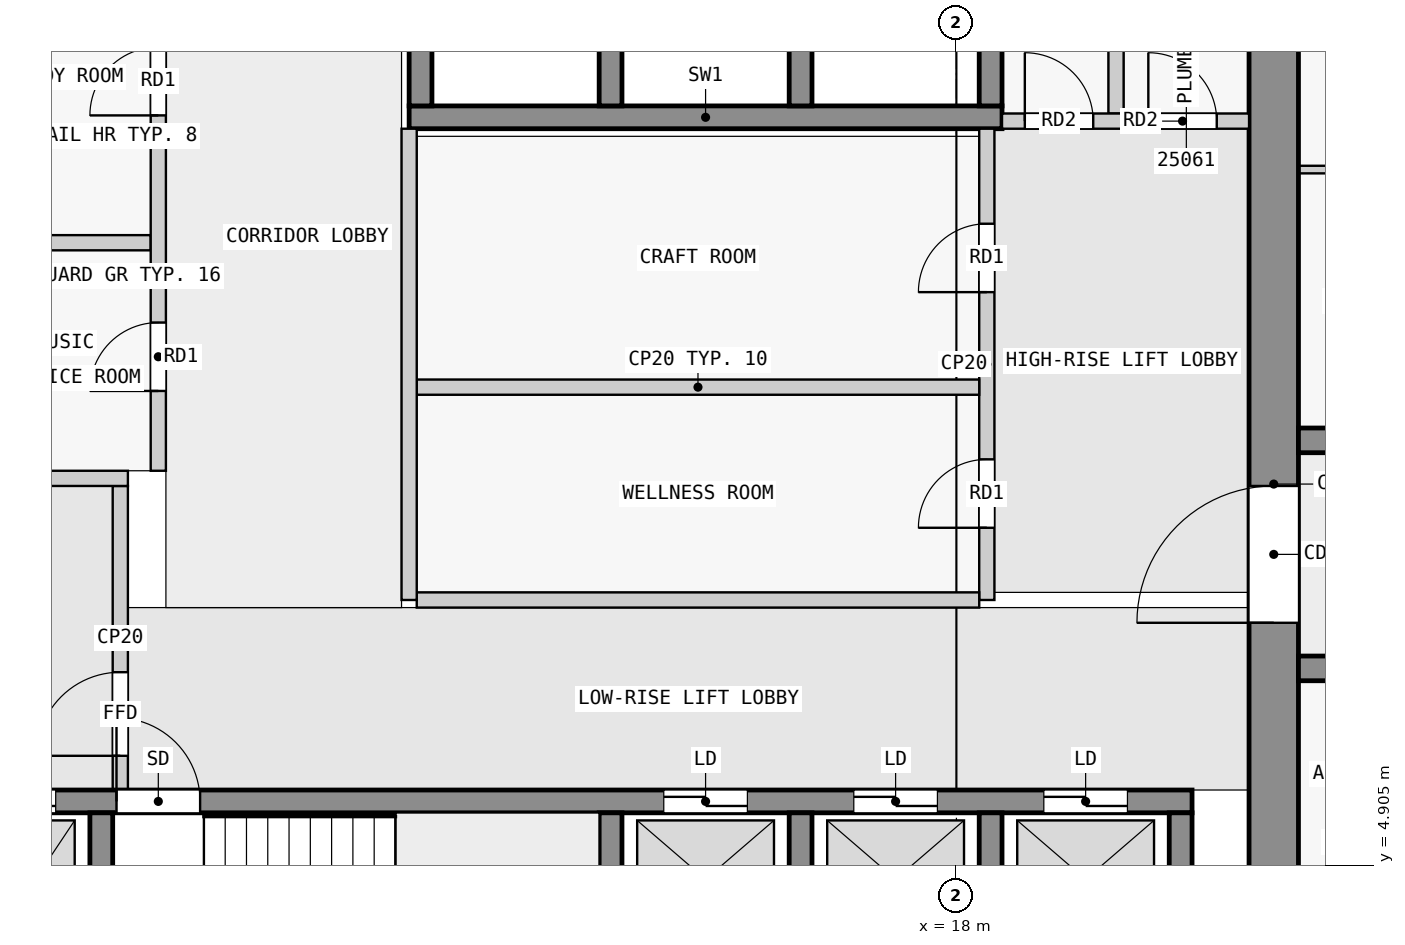
"""IFC4 building model, lengths in metres.
Left out: names, types, materials, properties, quantities, classifications, styles, units other than length and angle.
Written with IfcOpenShell. Run it as: python <this file> out.ifc"""

import sys

from ifc_helpers import new_model, si_unit, direction, frame, frame_2d, origin, place, context, subcontext, project, spatial, rectangle, extrude, element, fill, save


model = new_model("IFC4")
c1 = context("Model", 3, precision=1e-05, world=origin(), true_north=direction((0.0, 1.0)))
c2 = subcontext(c1, "Body", "Model", "MODEL_VIEW")
j1 = project(units=[si_unit("LENGTHUNIT", "METRE"), si_unit("PLANEANGLEUNIT", "RADIAN")], contexts=[c1])
p1 = place(None, origin())
s1 = spatial("IfcSite", under=j1, at=p1, CompositionType="ELEMENT")
p2 = place(p1, origin())
s2 = spatial("IfcBuilding", under=s1, at=p2, CompositionType="ELEMENT")
p3 = place(p2, frame((0.0, 0.0, 99.3)))
s3 = spatial("IfcBuildingStorey", under=s2, at=p3, CompositionType="ELEMENT", Elevation=99.3)
p4 = place(p3, frame((22.175, 2.5, 0.0), z_axis=(0.0, 0.0, 1.0), x_axis=(0.0, 1.0, 0.0)))
e1 = element("IfcWall", 1, at=p4, inside=s3, PredefinedType="SHEAR", context=c2, shape_type="SweptSolid", body=[
    extrude(rectangle(XDim=14.85, YDim=0.65, at=frame_2d((7.425, 0.0))), origin(), (0.0, 0.0, 1.0), 3.25),
])
p5 = place(p4, frame((5.6, 0.0, 0.0)))
e2 = element("IfcOpeningElement", 2, at=p5, cuts=e1, PredefinedType="OPENING", context=c2, shape_type="SweptSolid", body=[
    extrude(rectangle(XDim=1.8, YDim=2.1, at=frame_2d((0.9, 1.05))), frame((0.0, 0.335, 0.0), z_axis=(0.0, -1.0, 0.0), x_axis=(1.0, 0.0, 0.0)), (0.0, 0.0, 1.0), 0.67),
])
for number, where, z_axis, x_axis in (
    (3, (6.75, 2.8, 0.0), (0.0, 0.0, 1.0), (0.0, 1.0, 0.0)),
    (4, (13.45, 2.8, 0.0), (0.0, 0.0, 1.0), (0.0, 1.0, 0.0)),
    (5, (15.95, 2.8, 0.0), (0.0, 0.0, 1.0), (0.0, 1.0, 0.0)),
    (6, (18.45, 2.8, 0.0), (0.0, 0.0, 1.0), (0.0, 1.0, 0.0)),
    (7, (20.95, 2.8, 0.0), (0.0, 0.0, 1.0), (0.0, 1.0, 0.0)),
):
    element("IfcWall", number, at=place(p3, frame(where, z_axis=z_axis, x_axis=x_axis)), inside=s3, PredefinedType="SHEAR", context=c2, shape_type="SweptSolid", body=[
        extrude(rectangle(XDim=2.8, YDim=0.3, at=frame_2d((1.4, 0.0))), origin(), (0.0, 0.0, 1.0), 3.25),
    ])
p6 = place(p3, frame((2.3, 5.75, 0.0), z_axis=(0.0, 0.0, 1.0), x_axis=(1.0, 0.0, 0.0)))
e8 = element("IfcWall", 8, at=p6, inside=s3, PredefinedType="SHEAR", context=c2, shape_type="SweptSolid", body=[
    extrude(rectangle(XDim=18.8, YDim=0.3, at=frame_2d((9.4, 0.0))), origin(), (0.0, 0.0, 1.0), 3.25),
])
p7 = place(p6, frame((4.65, 0.0, 0.0)))
e9 = element("IfcOpeningElement", 9, at=p7, cuts=e8, PredefinedType="OPENING", context=c2, shape_type="SweptSolid", body=[
    extrude(rectangle(XDim=1.1, YDim=2.1, at=frame_2d((0.55, 1.05))), frame((0.0, 0.16, 0.0), z_axis=(0.0, -1.0, 0.0), x_axis=(1.0, 0.0, 0.0)), (0.0, 0.0, 1.0), 0.32),
])
p8 = place(p6, frame((0.45, 0.0, 0.0)))
e10 = element("IfcOpeningElement", 10, at=p8, cuts=e8, PredefinedType="OPENING", context=c2, shape_type="SweptSolid", body=[
    extrude(rectangle(XDim=1.1, YDim=2.1, at=frame_2d((0.55, 1.05))), frame((0.0, 0.16, 0.0), z_axis=(0.0, -1.0, 0.0), x_axis=(1.0, 0.0, 0.0)), (0.0, 0.0, 1.0), 0.32),
])
p9 = place(p6, frame((2.75, 0.0, 0.0)))
e11 = element("IfcOpeningElement", 11, at=p9, cuts=e8, PredefinedType="OPENING", context=c2, shape_type="SweptSolid", body=[
    extrude(rectangle(XDim=1.1, YDim=2.1, at=frame_2d((0.55, 1.05))), frame((0.0, 0.16, 0.0), z_axis=(0.0, -1.0, 0.0), x_axis=(1.0, 0.0, 0.0)), (0.0, 0.0, 1.0), 0.32),
])
p10 = place(p6, frame((11.85, 0.0, 0.0)))
e12 = element("IfcOpeningElement", 12, at=p10, cuts=e8, PredefinedType="OPENING", context=c2, shape_type="SweptSolid", body=[
    extrude(rectangle(XDim=1.1, YDim=2.1, at=frame_2d((0.55, 1.05))), frame((0.0, 0.16, 0.0), z_axis=(0.0, -1.0, 0.0), x_axis=(1.0, 0.0, 0.0)), (0.0, 0.0, 1.0), 0.32),
])
p11 = place(p6, frame((14.35, 0.0, 0.0)))
e13 = element("IfcOpeningElement", 13, at=p11, cuts=e8, PredefinedType="OPENING", context=c2, shape_type="SweptSolid", body=[
    extrude(rectangle(XDim=1.1, YDim=2.1, at=frame_2d((0.55, 1.05))), frame((0.0, 0.16, 0.0), z_axis=(0.0, -1.0, 0.0), x_axis=(1.0, 0.0, 0.0)), (0.0, 0.0, 1.0), 0.32),
])
p12 = place(p6, frame((16.85, 0.0, 0.0)))
e14 = element("IfcOpeningElement", 14, at=p12, cuts=e8, PredefinedType="OPENING", context=c2, shape_type="SweptSolid", body=[
    extrude(rectangle(XDim=1.1, YDim=2.1, at=frame_2d((0.55, 1.05))), frame((0.0, 0.16, 0.0), z_axis=(0.0, -1.0, 0.0), x_axis=(1.0, 0.0, 0.0)), (0.0, 0.0, 1.0), 0.32),
])
p13 = place(p3, frame((10.8, 14.75, 0.0), z_axis=(0.0, 0.0, 1.0), x_axis=(1.0, 0.0, 0.0)))
e15 = element("IfcWall", 15, at=p13, inside=s3, PredefinedType="SHEAR", context=c2, shape_type="SweptSolid", body=[
    extrude(rectangle(XDim=7.8, YDim=0.3, at=frame_2d((3.9, 0.0))), origin(), (0.0, 0.0, 1.0), 3.25),
])
for number, where, z_axis, x_axis in (
    (16, (10.95, 14.9, 0.0), (0.0, 0.0, 1.0), (0.0, 1.0, 0.0)),
    (17, (13.45, 14.9, 0.0), (0.0, 0.0, 1.0), (0.0, 1.0, 0.0)),
    (18, (15.95, 14.9, 0.0), (0.0, 0.0, 1.0), (0.0, 1.0, 0.0)),
    (19, (18.45, 14.9, 0.0), (0.0, 0.0, 1.0), (0.0, 1.0, 0.0)),
):
    element("IfcWall", number, at=place(p3, frame(where, z_axis=z_axis, x_axis=x_axis)), inside=s3, PredefinedType="SHEAR", context=c2, shape_type="SweptSolid", body=[
        extrude(rectangle(XDim=2.0, YDim=0.3, at=frame_2d((1.0, 0.0))), origin(), (0.0, 0.0, 1.0), 3.25),
    ])
p14 = place(p3, frame((22.5, 7.5, 0.0), z_axis=(0.0, 0.0, 1.0), x_axis=(1.0, 0.0, 0.0)))
e20 = element("IfcWall", 20, at=p14, inside=s3, PredefinedType="SHEAR", context=c2, shape_type="SweptSolid", body=[
    extrude(rectangle(XDim=22.5, YDim=0.325, at=frame_2d((11.25, 0.0))), origin(), (0.0, 0.0, 1.0), 3.25),
])
p15 = place(p14, frame((4.05, 0.0, 0.0)))
e21 = element("IfcOpeningElement", 21, at=p15, cuts=e20, PredefinedType="OPENING", context=c2, shape_type="SweptSolid", body=[
    extrude(rectangle(XDim=1.0, YDim=2.1, at=frame_2d((0.5, 1.05))), frame((0.0, 0.172, 0.0), z_axis=(0.0, -1.0, 0.0), x_axis=(1.0, 0.0, 0.0)), (0.0, 0.0, 1.0), 0.345),
])
p16 = place(p14, frame((10.75, 0.0, 0.0)))
e22 = element("IfcOpeningElement", 22, at=p16, cuts=e20, PredefinedType="OPENING", context=c2, shape_type="SweptSolid", body=[
    extrude(rectangle(XDim=1.0, YDim=2.1, at=frame_2d((0.5, 1.05))), frame((0.0, 0.172, 0.0), z_axis=(0.0, -1.0, 0.0), x_axis=(1.0, 0.0, 0.0)), (0.0, 0.0, 1.0), 0.345),
])
p17 = place(p14, frame((16.85, 0.0, 0.0)))
e23 = element("IfcOpeningElement", 23, at=p17, cuts=e20, PredefinedType="OPENING", context=c2, shape_type="SweptSolid", body=[
    extrude(rectangle(XDim=1.0, YDim=2.1, at=frame_2d((0.5, 1.05))), frame((0.0, 0.172, 0.0), z_axis=(0.0, -1.0, 0.0), x_axis=(1.0, 0.0, 0.0)), (0.0, 0.0, 1.0), 0.345),
])
p18 = place(p3, frame((22.5, 10.5, 0.0), z_axis=(0.0, 0.0, 1.0), x_axis=(1.0, 0.0, 0.0)))
e24 = element("IfcWall", 24, at=p18, inside=s3, PredefinedType="SHEAR", context=c2, shape_type="SweptSolid", body=[
    extrude(rectangle(XDim=22.5, YDim=0.325, at=frame_2d((11.25, 0.0))), origin(), (0.0, 0.0, 1.0), 3.25),
])
p19 = place(p18, frame((1.75, 0.0, 0.0)))
e25 = element("IfcOpeningElement", 25, at=p19, cuts=e24, PredefinedType="OPENING", context=c2, shape_type="SweptSolid", body=[
    extrude(rectangle(XDim=1.0, YDim=2.1, at=frame_2d((0.5, 1.05))), frame((0.0, 0.172, 0.0), z_axis=(0.0, -1.0, 0.0), x_axis=(1.0, 0.0, 0.0)), (0.0, 0.0, 1.0), 0.345),
])
p20 = place(p18, frame((6.25, 0.0, 0.0)))
e26 = element("IfcOpeningElement", 26, at=p20, cuts=e24, PredefinedType="OPENING", context=c2, shape_type="SweptSolid", body=[
    extrude(rectangle(XDim=1.0, YDim=2.1, at=frame_2d((0.5, 1.05))), frame((0.0, 0.172, 0.0), z_axis=(0.0, -1.0, 0.0), x_axis=(1.0, 0.0, 0.0)), (0.0, 0.0, 1.0), 0.345),
])
p21 = place(p18, frame((10.85, 0.0, 0.0)))
e27 = element("IfcOpeningElement", 27, at=p21, cuts=e24, PredefinedType="OPENING", context=c2, shape_type="SweptSolid", body=[
    extrude(rectangle(XDim=0.9, YDim=2.1, at=frame_2d((0.45, 1.05))), frame((0.0, 0.172, 0.0), z_axis=(0.0, -1.0, 0.0), x_axis=(1.0, 0.0, 0.0)), (0.0, 0.0, 1.0), 0.345),
])
p22 = place(p18, frame((15.25, 0.0, 0.0)))
e28 = element("IfcOpeningElement", 28, at=p22, cuts=e24, PredefinedType="OPENING", context=c2, shape_type="SweptSolid", body=[
    extrude(rectangle(XDim=1.0, YDim=2.1, at=frame_2d((0.5, 1.05))), frame((0.0, 0.172, 0.0), z_axis=(0.0, -1.0, 0.0), x_axis=(1.0, 0.0, 0.0)), (0.0, 0.0, 1.0), 0.345),
])
p23 = place(p18, frame((18.75, 0.0, 0.0)))
e29 = element("IfcOpeningElement", 29, at=p23, cuts=e24, PredefinedType="OPENING", context=c2, shape_type="SweptSolid", body=[
    extrude(rectangle(XDim=0.9, YDim=2.1, at=frame_2d((0.45, 1.05))), frame((0.0, 0.172, 0.0), z_axis=(0.0, -1.0, 0.0), x_axis=(1.0, 0.0, 0.0)), (0.0, 0.0, 1.0), 0.345),
])
p24 = place(p18, frame((20.95, 0.0, 0.0)))
e30 = element("IfcOpeningElement", 30, at=p24, cuts=e24, PredefinedType="OPENING", context=c2, shape_type="SweptSolid", body=[
    extrude(rectangle(XDim=1.0, YDim=2.1, at=frame_2d((0.5, 1.05))), frame((0.0, 0.172, 0.0), z_axis=(0.0, -1.0, 0.0), x_axis=(1.0, 0.0, 0.0)), (0.0, 0.0, 1.0), 0.345),
])
p25 = place(p3, frame((7.0, 5.9, 0.0), z_axis=(0.0, 0.0, 1.0), x_axis=(0.0, 1.0, 0.0)))
e31 = element("IfcWall", 31, at=p25, inside=s3, PredefinedType="PARTITIONING", context=c2, shape_type="SweptSolid", body=[
    extrude(rectangle(XDim=4.0, YDim=0.2, at=frame_2d((2.0, 0.0))), origin(), (0.0, 0.0, 1.0), 3.25),
])
p26 = place(p25, frame((0.45, 0.0, 0.0)))
e32 = element("IfcOpeningElement", 32, at=p26, cuts=e31, PredefinedType="OPENING", context=c2, shape_type="SweptSolid", body=[
    extrude(rectangle(XDim=1.1, YDim=2.1, at=frame_2d((0.55, 1.05))), frame((0.0, 0.11, 0.0), z_axis=(0.0, -1.0, 0.0), x_axis=(1.0, 0.0, 0.0)), (0.0, 0.0, 1.0), 0.22),
])
p27 = place(p3, frame((5.15, 10.0, 0.0), z_axis=(0.0, 0.0, 1.0), x_axis=(1.0, 0.0, 0.0)))
e33 = element("IfcWall", 33, at=p27, inside=s3, PredefinedType="PARTITIONING", context=c2, shape_type="SweptSolid", body=[
    extrude(rectangle(XDim=1.95, YDim=0.2, at=frame_2d((0.975, 0.0))), origin(), (0.0, 0.0, 1.0), 3.25),
])
p28 = place(p3, frame((10.8, 8.4, 0.0), z_axis=(0.0, 0.0, 1.0), x_axis=(0.0, 1.0, 0.0)))
e34 = element("IfcWall", 34, at=p28, inside=s3, PredefinedType="PARTITIONING", context=c2, shape_type="SweptSolid", body=[
    extrude(rectangle(XDim=6.2, YDim=0.2, at=frame_2d((3.1, 0.0))), origin(), (0.0, 0.0, 1.0), 3.25),
])
p29 = place(p3, frame((10.9, 8.4, 0.0), z_axis=(0.0, 0.0, 1.0), x_axis=(1.0, 0.0, 0.0)))
e35 = element("IfcWall", 35, at=p29, inside=s3, PredefinedType="PARTITIONING", context=c2, shape_type="SweptSolid", body=[
    extrude(rectangle(XDim=7.4, YDim=0.2, at=frame_2d((3.7, 0.0))), origin(), (0.0, 0.0, 1.0), 3.25),
])
p30 = place(p3, frame((18.4, 8.4, 0.0), z_axis=(0.0, 0.0, 1.0), x_axis=(0.0, 1.0, 0.0)))
e36 = element("IfcWall", 36, at=p30, inside=s3, PredefinedType="PARTITIONING", context=c2, shape_type="SweptSolid", body=[
    extrude(rectangle(XDim=6.2, YDim=0.2, at=frame_2d((3.1, 0.0))), origin(), (0.0, 0.0, 1.0), 3.25),
])
p31 = place(p30, frame((0.95, 0.0, 0.0)))
e37 = element("IfcOpeningElement", 37, at=p31, cuts=e36, PredefinedType="OPENING", context=c2, shape_type="SweptSolid", body=[
    extrude(rectangle(XDim=0.9, YDim=2.1, at=frame_2d((0.45, 1.05))), frame((0.0, 0.11, 0.0), z_axis=(0.0, -1.0, 0.0), x_axis=(1.0, 0.0, 0.0)), (0.0, 0.0, 1.0), 0.22),
])
p32 = place(p30, frame((4.05, 0.0, 0.0)))
e38 = element("IfcOpeningElement", 38, at=p32, cuts=e36, PredefinedType="OPENING", context=c2, shape_type="SweptSolid", body=[
    extrude(rectangle(XDim=0.9, YDim=2.1, at=frame_2d((0.45, 1.05))), frame((0.0, 0.11, 0.0), z_axis=(0.0, -1.0, 0.0), x_axis=(1.0, 0.0, 0.0)), (0.0, 0.0, 1.0), 0.22),
])
p33 = place(p3, frame((10.9, 11.2, 0.0), z_axis=(0.0, 0.0, 1.0), x_axis=(1.0, 0.0, 0.0)))
e39 = element("IfcWall", 39, at=p33, inside=s3, PredefinedType="PARTITIONING", context=c2, shape_type="SweptSolid", body=[
    extrude(rectangle(XDim=7.4, YDim=0.2, at=frame_2d((3.7, 0.0))), origin(), (0.0, 0.0, 1.0), 3.25),
])
p34 = place(p3, frame((7.5, 10.1, 0.0), z_axis=(0.0, 0.0, 1.0), x_axis=(0.0, 1.0, 0.0)))
e40 = element("IfcWall", 40, at=p34, inside=s3, PredefinedType="PARTITIONING", context=c2, shape_type="SweptSolid", body=[
    extrude(rectangle(XDim=7.25, YDim=0.2, at=frame_2d((3.625, 0.0))), origin(), (0.0, 0.0, 1.0), 3.25),
])
p35 = place(p34, frame((1.05, 0.0, 0.0)))
e41 = element("IfcOpeningElement", 41, at=p35, cuts=e40, PredefinedType="OPENING", context=c2, shape_type="SweptSolid", body=[
    extrude(rectangle(XDim=0.9, YDim=2.1, at=frame_2d((0.45, 1.05))), frame((0.0, 0.11, 0.0), z_axis=(0.0, -1.0, 0.0), x_axis=(1.0, 0.0, 0.0)), (0.0, 0.0, 1.0), 0.22),
])
p36 = place(p34, frame((4.675, 0.0, 0.0)))
e42 = element("IfcOpeningElement", 42, at=p36, cuts=e40, PredefinedType="OPENING", context=c2, shape_type="SweptSolid", body=[
    extrude(rectangle(XDim=0.9, YDim=2.1, at=frame_2d((0.45, 1.05))), frame((0.0, 0.11, 0.0), z_axis=(0.0, -1.0, 0.0), x_axis=(1.0, 0.0, 0.0)), (0.0, 0.0, 1.0), 0.22),
])
p37 = place(p3, frame((5.15, 13.1, 0.0), z_axis=(0.0, 0.0, 1.0), x_axis=(1.0, 0.0, 0.0)))
e43 = element("IfcWall", 43, at=p37, inside=s3, PredefinedType="PARTITIONING", context=c2, shape_type="SweptSolid", body=[
    extrude(rectangle(XDim=2.25, YDim=0.2, at=frame_2d((1.125, 0.0))), origin(), (0.0, 0.0, 1.0), 3.25),
])
p38 = place(p3, frame((18.6, 14.7, 0.0), z_axis=(0.0, 0.0, 1.0), x_axis=(1.0, 0.0, 0.0)))
e44 = element("IfcWall", 44, at=p38, inside=s3, PredefinedType="PARTITIONING", context=c2, shape_type="SweptSolid", body=[
    extrude(rectangle(XDim=3.25, YDim=0.2, at=frame_2d((1.625, 0.0))), origin(), (0.0, 0.0, 1.0), 3.25),
])
p39 = place(p38, frame((0.3, 0.0, 0.0)))
e45 = element("IfcOpeningElement", 45, at=p39, cuts=e44, PredefinedType="OPENING", context=c2, shape_type="SweptSolid", body=[
    extrude(rectangle(XDim=0.9, YDim=2.1, at=frame_2d((0.45, 1.05))), frame((0.0, 0.11, 0.0), z_axis=(0.0, -1.0, 0.0), x_axis=(1.0, 0.0, 0.0)), (0.0, 0.0, 1.0), 0.22),
])
p40 = place(p38, frame((1.925, 0.0, 0.0)))
e46 = element("IfcOpeningElement", 46, at=p40, cuts=e44, PredefinedType="OPENING", context=c2, shape_type="SweptSolid", body=[
    extrude(rectangle(XDim=0.9, YDim=2.1, at=frame_2d((0.45, 1.05))), frame((0.0, 0.11, 0.0), z_axis=(0.0, -1.0, 0.0), x_axis=(1.0, 0.0, 0.0)), (0.0, 0.0, 1.0), 0.22),
])
p41 = place(p3, frame((20.1, 14.8, 0.0), z_axis=(0.0, 0.0, 1.0), x_axis=(0.0, 1.0, 0.0)))
e47 = element("IfcWall", 47, at=p41, inside=s3, PredefinedType="PARTITIONING", context=c2, shape_type="SweptSolid", body=[
    extrude(rectangle(XDim=2.55, YDim=0.2, at=frame_2d((1.275, 0.0))), origin(), (0.0, 0.0, 1.0), 3.25),
])
p42 = place(p3, frame((23.95, 14.062, 0.0), z_axis=(0.0, 0.0, 1.0), x_axis=(-1.0, 0.0, 0.0)))
e48 = element("IfcWall", 48, at=p42, inside=s3, PredefinedType="PARTITIONING", context=c2, shape_type="SweptSolid", body=[
    extrude(rectangle(XDim=1.45, YDim=0.1, at=frame_2d((0.725, 0.0))), origin(), (0.0, 0.0, 1.0), 3.25),
])
p43 = place(p26, origin())
e49 = element("IfcDoor", 49, at=p43, inside=s3, OperationType="SINGLE_SWING_LEFT", PredefinedType="DOOR", context=c2, shape_type="SweptSolid", body=[
    extrude(rectangle(XDim=1.1, YDim=2.1, at=frame_2d((0.55, 1.05))), frame((0.0, 0.025, 0.0), z_axis=(0.0, -1.0, 0.0), x_axis=(1.0, 0.0, 0.0)), (0.0, 0.0, 1.0), 0.05),
])
fill(e32, e49)
p44 = place(p31, origin())
e50 = element("IfcDoor", 50, at=p44, inside=s3, OperationType="SINGLE_SWING_LEFT", PredefinedType="DOOR", context=c2, shape_type="SweptSolid", body=[
    extrude(rectangle(XDim=0.9, YDim=2.1, at=frame_2d((0.45, 1.05))), frame((0.0, 0.025, 0.0), z_axis=(0.0, -1.0, 0.0), x_axis=(1.0, 0.0, 0.0)), (0.0, 0.0, 1.0), 0.05),
])
fill(e37, e50)
p45 = place(p32, origin())
e51 = element("IfcDoor", 51, at=p45, inside=s3, OperationType="SINGLE_SWING_LEFT", PredefinedType="DOOR", context=c2, shape_type="SweptSolid", body=[
    extrude(rectangle(XDim=0.9, YDim=2.1, at=frame_2d((0.45, 1.05))), frame((0.0, 0.025, 0.0), z_axis=(0.0, -1.0, 0.0), x_axis=(1.0, 0.0, 0.0)), (0.0, 0.0, 1.0), 0.05),
])
fill(e38, e51)
p46 = place(p7, origin())
e52 = element("IfcDoor", 52, at=p46, inside=s3, OperationType="SINGLE_SWING_LEFT", PredefinedType="DOOR", context=c2, shape_type="SweptSolid", body=[
    extrude(rectangle(XDim=1.1, YDim=2.1, at=frame_2d((0.55, 1.05))), frame((0.0, 0.025, 0.0), z_axis=(0.0, -1.0, 0.0), x_axis=(1.0, 0.0, 0.0)), (0.0, 0.0, 1.0), 0.05),
])
fill(e9, e52)
p47 = place(p9, origin())
e53 = element("IfcDoor", 53, at=p47, inside=s3, OperationType="DOUBLE_DOOR_SLIDING", PredefinedType="DOOR", context=c2, shape_type="SweptSolid", body=[
    extrude(rectangle(XDim=1.1, YDim=2.1, at=frame_2d((0.55, 1.05))), frame((0.0, 0.025, 0.0), z_axis=(0.0, -1.0, 0.0), x_axis=(1.0, 0.0, 0.0)), (0.0, 0.0, 1.0), 0.05),
])
fill(e11, e53)
p48 = place(p10, origin())
e54 = element("IfcDoor", 54, at=p48, inside=s3, OperationType="DOUBLE_DOOR_SLIDING", PredefinedType="DOOR", context=c2, shape_type="SweptSolid", body=[
    extrude(rectangle(XDim=1.1, YDim=2.1, at=frame_2d((0.55, 1.05))), frame((0.0, 0.025, 0.0), z_axis=(0.0, -1.0, 0.0), x_axis=(1.0, 0.0, 0.0)), (0.0, 0.0, 1.0), 0.05),
])
fill(e12, e54)
p49 = place(p11, origin())
e55 = element("IfcDoor", 55, at=p49, inside=s3, OperationType="DOUBLE_DOOR_SLIDING", PredefinedType="DOOR", context=c2, shape_type="SweptSolid", body=[
    extrude(rectangle(XDim=1.1, YDim=2.1, at=frame_2d((0.55, 1.05))), frame((0.0, 0.025, 0.0), z_axis=(0.0, -1.0, 0.0), x_axis=(1.0, 0.0, 0.0)), (0.0, 0.0, 1.0), 0.05),
])
fill(e13, e55)
p50 = place(p12, origin())
e56 = element("IfcDoor", 56, at=p50, inside=s3, OperationType="DOUBLE_DOOR_SLIDING", PredefinedType="DOOR", context=c2, shape_type="SweptSolid", body=[
    extrude(rectangle(XDim=1.1, YDim=2.1, at=frame_2d((0.55, 1.05))), frame((0.0, 0.025, 0.0), z_axis=(0.0, -1.0, 0.0), x_axis=(1.0, 0.0, 0.0)), (0.0, 0.0, 1.0), 0.05),
])
fill(e14, e56)
p51 = place(p5, origin())
e57 = element("IfcDoor", 57, at=p51, inside=s3, OperationType="DOUBLE_DOOR_SINGLE_SWING", PredefinedType="DOOR", context=c2, shape_type="SweptSolid", body=[
    extrude(rectangle(XDim=1.8, YDim=2.1, at=frame_2d((0.9, 1.05))), frame((0.0, 0.025, 0.0), z_axis=(0.0, -1.0, 0.0), x_axis=(1.0, 0.0, 0.0)), (0.0, 0.0, 1.0), 0.05),
])
fill(e2, e57)
p52 = place(p35, origin())
e58 = element("IfcDoor", 58, at=p52, inside=s3, OperationType="SINGLE_SWING_RIGHT", PredefinedType="DOOR", context=c2, shape_type="SweptSolid", body=[
    extrude(rectangle(XDim=0.9, YDim=2.1, at=frame_2d((0.45, 1.05))), frame((0.0, 0.025, 0.0), z_axis=(0.0, -1.0, 0.0), x_axis=(1.0, 0.0, 0.0)), (0.0, 0.0, 1.0), 0.05),
])
fill(e41, e58)
p53 = place(p36, origin())
e59 = element("IfcDoor", 59, at=p53, inside=s3, OperationType="SINGLE_SWING_RIGHT", PredefinedType="DOOR", context=c2, shape_type="SweptSolid", body=[
    extrude(rectangle(XDim=0.9, YDim=2.1, at=frame_2d((0.45, 1.05))), frame((0.0, 0.025, 0.0), z_axis=(0.0, -1.0, 0.0), x_axis=(1.0, 0.0, 0.0)), (0.0, 0.0, 1.0), 0.05),
])
fill(e42, e59)
p54 = place(p39, origin())
e60 = element("IfcDoor", 60, at=p54, inside=s3, OperationType="SINGLE_SWING_LEFT", PredefinedType="DOOR", context=c2, shape_type="SweptSolid", body=[
    extrude(rectangle(XDim=0.9, YDim=2.1, at=frame_2d((0.45, 1.05))), frame((0.0, 0.025, 0.0), z_axis=(0.0, -1.0, 0.0), x_axis=(1.0, 0.0, 0.0)), (0.0, 0.0, 1.0), 0.05),
])
fill(e45, e60)
p55 = place(p40, origin())
e61 = element("IfcDoor", 61, at=p55, inside=s3, OperationType="SINGLE_SWING_LEFT", PredefinedType="DOOR", context=c2, shape_type="SweptSolid", body=[
    extrude(rectangle(XDim=0.9, YDim=2.1, at=frame_2d((0.45, 1.05))), frame((0.0, 0.025, 0.0), z_axis=(0.0, -1.0, 0.0), x_axis=(1.0, 0.0, 0.0)), (0.0, 0.0, 1.0), 0.05),
])
fill(e46, e61)
save(model, sys.argv[1])
